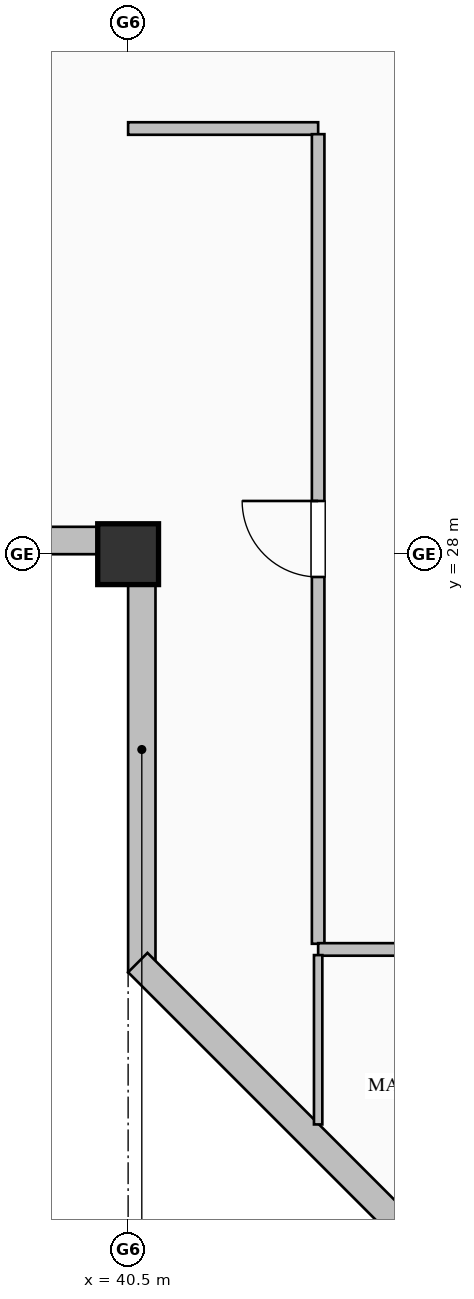
"""IFC4 building model, lengths in metres.
Left out: names, types, materials, properties, quantities, classifications, styles, units other than length and angle.
Written with IfcOpenShell. Run it as: python <this file> out.ifc"""

import sys

from ifc_helpers import new_model, si_unit, direction, frame, frame_2d, origin, origin_2d, place, context, subcontext, project, spatial, rectangle, hollow_rectangle, extrude, element, fill, save


model = new_model("IFC4")
c1 = context("Model", 3, precision=1e-05, world=origin(), true_north=direction((0.0, 1.0)))
c2 = subcontext(c1, "Body", "Model", "MODEL_VIEW")
j1 = project(units=[si_unit("LENGTHUNIT", "METRE"), si_unit("PLANEANGLEUNIT", "RADIAN")], contexts=[c1])
p1 = place(None, origin())
s1 = spatial("IfcSite", under=j1, at=p1, CompositionType="ELEMENT")
p2 = place(p1, origin())
s2 = spatial("IfcBuilding", under=s1, at=p2, CompositionType="ELEMENT")
p3 = place(p2, frame((0.0, 0.0, 303.2)))
s3 = spatial("IfcBuildingStorey", under=s2, at=p3, CompositionType="ELEMENT", Elevation=303.2)
p4 = place(p3, frame((40.5, 28.0, 0.0), z_axis=(0.0, 0.0, 1.0), x_axis=(1.0, 0.0, 0.0)))
e1 = element("IfcColumn", 1, at=p4, inside=s3, PredefinedType="COLUMN", context=c2, shape_type="SweptSolid", body=[
    extrude(hollow_rectangle(XDim=0.8, YDim=0.8, WallThickness=0.032, at=origin_2d()), origin(), (0.0, 0.0, 1.0), 4.0),
])
p5 = place(p3, frame((40.68, 22.5, 0.0), z_axis=(0.0, 0.0, 1.0), x_axis=(0.0, 1.0, 0.0)))
e2 = element("IfcWall", 2, at=p5, inside=s3, PredefinedType="SOLIDWALL", context=c2, shape_type="SweptSolid", body=[
    extrude(rectangle(XDim=5.86, YDim=0.36, at=frame_2d((2.93, 0.0))), origin(), (0.0, 0.0, 1.0), 3.185),
])
p6 = place(p3, frame((40.52, 28.18, 0.0), z_axis=(0.0, 0.0, 1.0), x_axis=(-1.0, 0.0, 0.0)))
e3 = element("IfcWall", 3, at=p6, inside=s3, PredefinedType="SOLIDWALL", context=c2, shape_type="SweptSolid", body=[
    extrude(rectangle(XDim=20.02, YDim=0.36, at=frame_2d((10.01, 0.0))), origin(), (0.0, 0.0, 1.0), 3.185),
])
p7 = place(p6, frame((2.925, 0.0, 0.9)))
e4 = element("IfcOpeningElement", 4, at=p7, cuts=e3, PredefinedType="OPENING", context=c2, shape_type="SweptSolid", body=[
    extrude(rectangle(XDim=1.35, YDim=1.85, at=frame_2d((0.675, 0.925))), frame((0.0, 0.19, 0.0), z_axis=(0.0, -1.0, 0.0), x_axis=(1.0, 0.0, 0.0)), (0.0, 0.0, 1.0), 0.38),
])
p8 = place(p6, frame((10.275, 0.0, 0.8)))
e5 = element("IfcOpeningElement", 5, at=p8, cuts=e3, PredefinedType="OPENING", context=c2, shape_type="SweptSolid", body=[
    extrude(rectangle(XDim=1.05, YDim=2.15, at=frame_2d((0.525, 1.075))), frame((0.0, 0.19, 0.0), z_axis=(0.0, -1.0, 0.0), x_axis=(1.0, 0.0, 0.0)), (0.0, 0.0, 1.0), 0.38),
])
p9 = place(p6, frame((13.725, 0.0, 0.9)))
e6 = element("IfcOpeningElement", 6, at=p9, cuts=e3, PredefinedType="OPENING", context=c2, shape_type="SweptSolid", body=[
    extrude(rectangle(XDim=1.35, YDim=1.85, at=frame_2d((0.675, 0.925))), frame((0.0, 0.19, 0.0), z_axis=(0.0, -1.0, 0.0), x_axis=(1.0, 0.0, 0.0)), (0.0, 0.0, 1.0), 0.38),
])
p10 = place(p3, frame((44.627, 18.627, 0.0), z_axis=(0.0, 0.0, 1.0), x_axis=(-0.707106781187, 0.707106781187, 0.0)))
e7 = element("IfcWall", 7, at=p10, inside=s3, PredefinedType="SOLIDWALL", context=c2, shape_type="SweptSolid", body=[
    extrude(rectangle(XDim=5.657, YDim=0.36, at=frame_2d((2.828, 0.0))), origin(), (0.0, 0.0, 1.0), 3.785),
])
p11 = place(p3, frame((43.0, 33.6, 0.0), z_axis=(0.0, 0.0, 1.0), x_axis=(-1.0, 0.0, 0.0)))
e8 = element("IfcWall", 8, at=p11, inside=s3, PredefinedType="PARTITIONING", context=c2, shape_type="SweptSolid", body=[
    extrude(rectangle(XDim=2.5, YDim=0.165, at=frame_2d((1.25, 0.0))), origin(), (0.0, 0.0, 1.0), 3.785),
])
p12 = place(p3, frame((43.0, 22.875, 0.0), z_axis=(0.0, 0.0, 1.0), x_axis=(0.0, 1.0, 0.0)))
e9 = element("IfcWall", 9, at=p12, inside=s3, PredefinedType="PARTITIONING", context=c2, shape_type="SweptSolid", body=[
    extrude(rectangle(XDim=10.651, YDim=0.165, at=frame_2d((5.325, 0.0))), origin(), (0.0, 0.0, 1.0), 3.785),
])
p13 = place(p12, frame((4.825, 0.0, 0.0)))
e10 = element("IfcOpeningElement", 10, at=p13, cuts=e9, PredefinedType="OPENING", context=c2, shape_type="SweptSolid", body=[
    extrude(rectangle(XDim=1.0, YDim=2.15, at=frame_2d((0.5, 1.075))), frame((0.0, 0.093, 0.0), z_axis=(0.0, -1.0, 0.0), x_axis=(1.0, 0.0, 0.0)), (0.0, 0.0, 1.0), 0.185),
])
p14 = place(p3, frame((45.2, 22.8, 0.0), z_axis=(0.0, 0.0, 1.0), x_axis=(-1.0, 0.0, 0.0)))
e11 = element("IfcWall", 11, at=p14, inside=s3, PredefinedType="PARTITIONING", context=c2, shape_type="SweptSolid", body=[
    extrude(rectangle(XDim=2.2, YDim=0.165, at=frame_2d((1.1, 0.0))), origin(), (0.0, 0.0, 1.0), 3.785),
])
p15 = place(p3, frame((43.0, 22.726, 0.0), z_axis=(0.0, 0.0, 1.0), x_axis=(0.0, -1.0, 0.0)))
e12 = element("IfcWall", 12, at=p15, inside=s3, PredefinedType="MOVABLE", context=c2, shape_type="SweptSolid", body=[
    extrude(rectangle(XDim=2.228, YDim=0.11, at=frame_2d((1.114, 0.0))), origin(), (0.0, 0.0, 1.0), 3.785),
])
p16 = place(p13, origin())
e13 = element("IfcDoor", 13, at=p16, inside=s3, OperationType="SINGLE_SWING_RIGHT", PredefinedType="DOOR", context=c2, shape_type="SweptSolid", body=[
    extrude(rectangle(XDim=1.0, YDim=2.15, at=frame_2d((0.5, 1.075))), frame((0.0, 0.025, 0.0), z_axis=(0.0, -1.0, 0.0), x_axis=(1.0, 0.0, 0.0)), (0.0, 0.0, 1.0), 0.05),
])
fill(e10, e13)
save(model, sys.argv[1])
